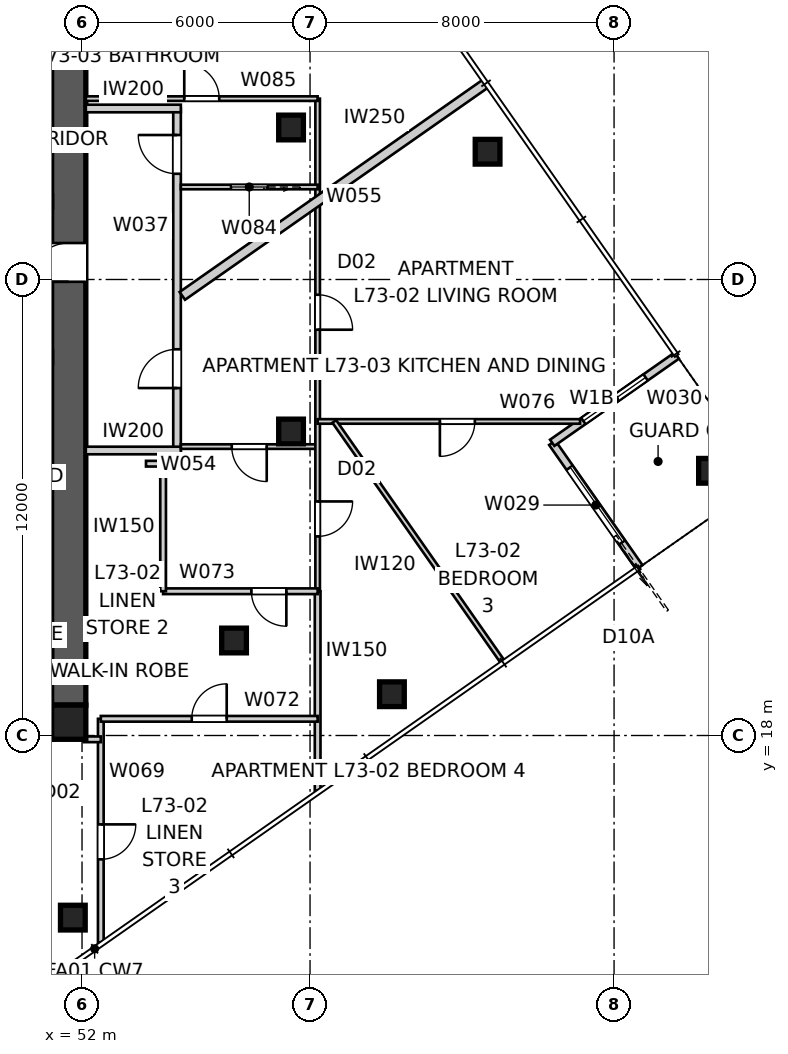
"""IFC4 building model, lengths in metres.
Left out: names, types, materials, properties, quantities, classifications, styles, units other than length and angle.
Written with IfcOpenShell. Run it as: python <this file> out.ifc"""

import sys

from ifc_helpers import new_model, si_unit, direction, frame, frame_2d, origin, origin_2d, place, context, subcontext, project, spatial, polyline, rectangle, outline, extrude, element, fill, save


model = new_model("IFC4")
c1 = context("Model", 3, precision=1e-05, world=origin(), true_north=direction((0.0, 1.0)))
c2 = subcontext(c1, "Body", "Model", "MODEL_VIEW")
j1 = project(units=[si_unit("LENGTHUNIT", "METRE"), si_unit("PLANEANGLEUNIT", "RADIAN")], contexts=[c1])
p1 = place(None, origin())
s1 = spatial("IfcSite", under=j1, at=p1, CompositionType="ELEMENT")
p2 = place(p1, origin())
s2 = spatial("IfcBuilding", under=s1, at=p2, CompositionType="ELEMENT")
p3 = place(p2, frame((0.0, 0.0, 264.2)))
s3 = spatial("IfcBuildingStorey", under=s2, at=p3, CompositionType="ELEMENT", Elevation=264.2)
p4 = place(p3, frame((51.2, 18.35, 0.0), z_axis=(0.0, 0.0, 1.0), x_axis=(-1.0, 0.0, 0.0)))
e1 = element("IfcWall", 1, at=p4, inside=s3, PredefinedType="SHEAR", context=c2, shape_type="SweptSolid", body=[
    extrude(outline(polyline([(0.0, -0.45), (22.4, -0.45), (22.4, -0.025), (22.85, -0.025), (22.85, 0.025), (22.4, 0.025), (22.4, 0.45), (0.0, 0.45), (0.0, 0.025), (-0.45, 0.025), (-0.45, -0.025), (0.0, -0.025), (0.0, -0.45)])), origin(), (0.0, 0.0, 1.0), 3.4),
])
p5 = place(p3, frame((51.65, 18.8, 0.0), z_axis=(0.0, 0.0, 1.0), x_axis=(0.0, 1.0, 0.0)))
e2 = element("IfcWall", 2, at=p5, inside=s3, PredefinedType="SHEAR", context=c2, shape_type="SweptSolid", body=[
    extrude(outline(polyline([(0.0, -0.45), (22.4, -0.45), (22.4, -0.025), (22.85, -0.025), (22.85, 0.025), (22.4, 0.025), (22.4, 0.45), (0.0, 0.45), (0.0, 0.025), (-0.45, 0.025), (-0.45, -0.025), (0.0, -0.025), (0.0, -0.45)])), origin(), (0.0, 0.0, 1.0), 3.4),
])
p6 = place(p5, frame((11.14, 0.0, 0.0)))
e3 = element("IfcOpeningElement", 3, at=p6, cuts=e2, PredefinedType="OPENING", context=c2, shape_type="SweptSolid", body=[
    extrude(rectangle(XDim=1.02, YDim=2.4, at=frame_2d((0.51, 1.2))), frame((0.0, 0.46, 0.0), z_axis=(0.0, -1.0, 0.0), x_axis=(1.0, 0.0, 0.0)), (0.0, 0.0, 1.0), 0.92),
])
p7 = place(p3, frame((51.65, 18.35, 0.0), z_axis=(0.0, 0.0, 1.0), x_axis=(1.0, 0.0, 0.0)))
e4 = element("IfcColumn", 4, at=p7, inside=s3, PredefinedType="COLUMN", context=c2, shape_type="SweptSolid", body=[
    extrude(rectangle(XDim=0.9, YDim=0.9, at=origin_2d()), origin(), (0.0, 0.0, 1.0), 3.4),
])
for number, where, z_axis, x_axis in (
    (5, (51.758, 13.207, 0.0), (0.0, 0.0, 1.0), (1.0, 0.0, 0.0)),
    (6, (60.155, 19.086, 0.0), (0.0, 0.0, 1.0), (1.0, 0.0, 0.0)),
    (7, (68.551, 24.966, 0.0), (0.0, 0.0, 1.0), (1.0, 0.0, 0.0)),
    (8, (62.672, 33.362, 0.0), (0.0, 0.0, 1.0), (1.0, 0.0, 0.0)),
):
    element("IfcColumn", number, at=place(p3, frame(where, z_axis=z_axis, x_axis=x_axis)), inside=s3, PredefinedType="COLUMN", context=c2, shape_type="SweptSolid", body=[
        extrude(rectangle(XDim=0.65, YDim=0.65, at=origin_2d()), origin(), (0.0, 0.0, 1.0), 3.2),
    ])
for number, where, z_axis, x_axis in (
    (9, (57.5, 26.0, 0.0), (0.0, 0.0, 1.0), (1.0, 0.0, 0.0)),
    (10, (57.5, 34.0, 0.0), (0.0, 0.0, 1.0), (1.0, 0.0, 0.0)),
    (11, (56.0, 20.5, 0.0), (0.0, 0.0, 1.0), (1.0, 0.0, 0.0)),
):
    element("IfcColumn", number, at=place(p3, frame(where, z_axis=z_axis, x_axis=x_axis)), inside=s3, PredefinedType="COLUMN", context=c2, shape_type="SweptSolid", body=[
        extrude(rectangle(XDim=0.65, YDim=0.65, at=origin_2d()), origin(), (0.0, 0.0, 1.0), 3.4),
    ])
p8 = place(p3, frame((66.667, 22.426, 0.0), z_axis=(0.0, 0.0, 1.0), x_axis=(-0.573556557423, 0.819165963305, 0.0)))
e12 = element("IfcWall", 12, at=p8, inside=s3, PredefinedType="SOLIDWALL", context=c2, shape_type="SweptSolid", body=[
    extrude(rectangle(XDim=4.0, YDim=0.2, at=frame_2d((2.0, 0.0))), origin(), (0.0, 0.0, 1.0), 3.2),
])
p9 = place(p8, frame((0.8, 0.0, 0.0)))
e13 = element("IfcOpeningElement", 13, at=p9, cuts=e12, PredefinedType="OPENING", context=c2, shape_type="SweptSolid", body=[
    extrude(rectangle(XDim=2.4, YDim=2.1, at=frame_2d((1.2, 1.05))), frame((0.0, 0.11, 0.0), z_axis=(0.0, -1.0, 0.0), x_axis=(1.0, 0.0, 0.0)), (0.0, 0.0, 1.0), 0.22),
])
p10 = place(p3, frame((64.373, 25.702, 0.0), z_axis=(0.0, 0.0, 1.0), x_axis=(0.819137286189, 0.573597512525, 0.0)))
e14 = element("IfcWall", 14, at=p10, inside=s3, PredefinedType="SOLIDWALL", context=c2, shape_type="SweptSolid", body=[
    extrude(rectangle(XDim=4.0, YDim=0.2, at=frame_2d((2.0, 0.0))), origin(), (0.0, 0.0, 1.0), 3.2),
])
p11 = place(p10, frame((1.0, 0.0, 0.4)))
e15 = element("IfcOpeningElement", 15, at=p11, cuts=e14, PredefinedType="OPENING", context=c2, shape_type="SweptSolid", body=[
    extrude(rectangle(XDim=2.0, YDim=1.8, at=frame_2d((1.0, 0.9))), frame((0.0, 0.11, 0.0), z_axis=(0.0, -1.0, 0.0), x_axis=(1.0, 0.0, 0.0)), (0.0, 0.0, 1.0), 0.22),
])
p12 = place(p3, frame((54.5, 25.5, 0.0), z_axis=(0.0, 0.0, 1.0), x_axis=(0.0, 1.0, 0.0)))
e16 = element("IfcWall", 16, at=p12, inside=s3, PredefinedType="PARTITIONING", context=c2, shape_type="SweptSolid", body=[
    extrude(rectangle(XDim=9.0, YDim=0.2, at=frame_2d((4.5, 0.0))), origin(), (0.0, 0.0, 1.0), 3.2),
])
p13 = place(p12, frame((1.643, 0.0, 0.0)))
e17 = element("IfcOpeningElement", 17, at=p13, cuts=e16, PredefinedType="OPENING", context=c2, shape_type="SweptSolid", body=[
    extrude(rectangle(XDim=1.02, YDim=2.34, at=frame_2d((0.51, 1.17))), frame((0.0, 0.11, 0.0), z_axis=(0.0, -1.0, 0.0), x_axis=(1.0, 0.0, 0.0)), (0.0, 0.0, 1.0), 0.22),
])
p14 = place(p12, frame((7.282, 0.0, 0.0)))
e18 = element("IfcOpeningElement", 18, at=p14, cuts=e16, PredefinedType="OPENING", context=c2, shape_type="SweptSolid", body=[
    extrude(rectangle(XDim=1.02, YDim=2.34, at=frame_2d((0.51, 1.17))), frame((0.0, 0.11, 0.0), z_axis=(0.0, -1.0, 0.0), x_axis=(1.0, 0.0, 0.0)), (0.0, 0.0, 1.0), 0.22),
])
for number, where, z_axis, x_axis in (
    (19, (52.1, 34.5, 0.0), (0.0, 0.0, 1.0), (1.0, 0.0, 0.0)),
    (20, (52.1, 25.5, 0.0), (0.0, 0.0, 1.0), (1.0, 0.0, 0.0)),
):
    element("IfcWall", number, at=place(p3, frame(where, z_axis=z_axis, x_axis=x_axis)), inside=s3, PredefinedType="PARTITIONING", context=c2, shape_type="SweptSolid", body=[
        extrude(rectangle(XDim=2.5, YDim=0.2, at=frame_2d((1.25, 0.0))), origin(), (0.0, 0.0, 1.0), 3.2),
    ])
p15 = place(p3, frame((62.631, 35.164, 0.0), z_axis=(0.0, 0.0, 1.0), x_axis=(-0.81915902312, -0.573566469418, 0.0)))
e21 = element("IfcWall", 21, at=p15, inside=s3, PredefinedType="PARTITIONING", context=c2, shape_type="SweptSolid", body=[
    extrude(rectangle(XDim=9.756, YDim=0.25, at=frame_2d((4.878, 0.0))), origin(), (0.0, 0.0, 1.0), 3.2),
])
p16 = place(p3, frame((58.2, 25.603, 0.0), z_axis=(0.0, 0.0, 1.0), x_axis=(-1.0, 0.0, 0.0)))
e22 = element("IfcWall", 22, at=p16, inside=s3, PredefinedType="PARTITIONING", context=c2, shape_type="SweptSolid", body=[
    extrude(rectangle(XDim=3.6, YDim=0.12, at=frame_2d((1.8, 0.0))), origin(), (0.0, 0.0, 1.0), 3.2),
])
p17 = place(p16, frame((1.34, 0.0, 0.0)))
e23 = element("IfcOpeningElement", 23, at=p17, cuts=e22, PredefinedType="OPENING", context=c2, shape_type="SweptSolid", body=[
    extrude(rectangle(XDim=0.92, YDim=2.34, at=frame_2d((0.46, 1.17))), frame((0.0, 0.07, 0.0), z_axis=(0.0, -1.0, 0.0), x_axis=(1.0, 0.0, 0.0)), (0.0, 0.0, 1.0), 0.14),
])
p18 = place(p3, frame((58.2, 34.76, 0.0), z_axis=(0.0, 0.0, 1.0), x_axis=(0.0, -1.0, 0.0)))
e24 = element("IfcWall", 24, at=p18, inside=s3, PredefinedType="PARTITIONING", context=c2, shape_type="SweptSolid", body=[
    extrude(rectangle(XDim=12.964, YDim=0.12, at=frame_2d((6.482, 0.0))), origin(), (0.0, 0.0, 1.0), 3.2),
])
p19 = place(p18, frame((5.162, 0.0, 0.0)))
e25 = element("IfcOpeningElement", 25, at=p19, cuts=e24, PredefinedType="OPENING", context=c2, shape_type="SweptSolid", body=[
    extrude(rectangle(XDim=0.92, YDim=2.34, at=frame_2d((0.46, 1.17))), frame((0.0, 0.07, 0.0), z_axis=(0.0, -1.0, 0.0), x_axis=(1.0, 0.0, 0.0)), (0.0, 0.0, 1.0), 0.14),
])
p20 = place(p18, frame((10.6, 0.0, 0.0)))
e26 = element("IfcOpeningElement", 26, at=p20, cuts=e24, PredefinedType="OPENING", context=c2, shape_type="SweptSolid", body=[
    extrude(rectangle(XDim=0.92, YDim=2.34, at=frame_2d((0.46, 1.17))), frame((0.0, 0.07, 0.0), z_axis=(0.0, -1.0, 0.0), x_axis=(1.0, 0.0, 0.0)), (0.0, 0.0, 1.0), 0.14),
])
p21 = place(p3, frame((51.422, 11.8, 0.0), z_axis=(0.0, 0.0, 1.0), x_axis=(-1.0, 0.0, 0.0)))
e27 = element("IfcWall", 27, at=p21, inside=s3, PredefinedType="PARTITIONING", context=c2, shape_type="SweptSolid", body=[
    extrude(rectangle(XDim=6.213, YDim=0.12, at=frame_2d((3.106, 0.0))), origin(), (0.0, 0.0, 1.0), 3.2),
])
p22 = place(p21, frame((1.061, 0.0, 0.0)))
e28 = element("IfcOpeningElement", 28, at=p22, cuts=e27, PredefinedType="OPENING", context=c2, shape_type="SweptSolid", body=[
    extrude(rectangle(XDim=0.92, YDim=2.1, at=frame_2d((0.46, 1.05))), frame((0.0, 0.07, 0.0), z_axis=(0.0, -1.0, 0.0), x_axis=(1.0, 0.0, 0.0)), (0.0, 0.0, 1.0), 0.14),
])
p23 = place(p3, frame((52.494, 18.439, 0.0), z_axis=(0.0, 0.0, 1.0), x_axis=(0.0, -1.0, 0.0)))
e29 = element("IfcWall", 29, at=p23, inside=s3, PredefinedType="SOLIDWALL", context=c2, shape_type="SweptSolid", body=[
    extrude(rectangle(XDim=5.888, YDim=0.15, at=frame_2d((2.944, 0.0))), origin(), (0.0, 0.0, 1.0), 3.2),
])
p24 = place(p23, frame((2.778, 0.0, 0.0)))
e30 = element("IfcOpeningElement", 30, at=p24, cuts=e29, PredefinedType="OPENING", context=c2, shape_type="SweptSolid", body=[
    extrude(rectangle(XDim=0.92, YDim=2.34, at=frame_2d((0.46, 1.17))), frame((0.0, 0.085, 0.0), z_axis=(0.0, -1.0, 0.0), x_axis=(1.0, 0.0, 0.0)), (0.0, 0.0, 1.0), 0.17),
])
p25 = place(p3, frame((52.05, 17.9, 0.0), z_axis=(0.0, 0.0, 1.0), x_axis=(1.0, 0.0, 0.0)))
e31 = element("IfcWall", 31, at=p25, inside=s3, PredefinedType="SOLIDWALL", context=c2, shape_type="SweptSolid", body=[
    extrude(rectangle(XDim=0.444, YDim=0.15, at=frame_2d((0.222, 0.0))), origin(), (0.0, 0.0, 1.0), 3.2),
])
p26 = place(p3, frame((58.2, 21.796, 0.0), z_axis=(0.0, 0.0, 1.0), x_axis=(0.0, -1.0, 0.0)))
e32 = element("IfcWall", 32, at=p26, inside=s3, PredefinedType="SOLIDWALL", context=c2, shape_type="SweptSolid", body=[
    extrude(rectangle(XDim=5.25, YDim=0.15, at=frame_2d((2.625, 0.0))), origin(), (0.0, 0.0, 1.0), 3.2),
])
p27 = place(p3, frame((52.494, 18.439, 0.0), z_axis=(0.0, 0.0, 1.0), x_axis=(1.0, 0.0, 0.0)))
e33 = element("IfcWall", 33, at=p27, inside=s3, PredefinedType="SOLIDWALL", context=c2, shape_type="SweptSolid", body=[
    extrude(rectangle(XDim=5.706, YDim=0.15, at=frame_2d((2.853, 0.0))), origin(), (0.0, 0.0, 1.0), 3.2),
])
p28 = place(p27, frame((2.393, 0.0, 0.0)))
e34 = element("IfcOpeningElement", 34, at=p28, cuts=e33, PredefinedType="OPENING", context=c2, shape_type="SweptSolid", body=[
    extrude(rectangle(XDim=0.92, YDim=2.34, at=frame_2d((0.46, 1.17))), frame((0.0, 0.085, 0.0), z_axis=(0.0, -1.0, 0.0), x_axis=(1.0, 0.0, 0.0)), (0.0, 0.0, 1.0), 0.17),
])
p29 = place(p3, frame((58.2, 21.796, 0.0), z_axis=(0.0, 0.0, 1.0), x_axis=(-1.0, 0.0, 0.0)))
e35 = element("IfcWall", 35, at=p29, inside=s3, PredefinedType="SOLIDWALL", context=c2, shape_type="SweptSolid", body=[
    extrude(rectangle(XDim=4.067, YDim=0.15, at=frame_2d((2.033, 0.0))), origin(), (0.0, 0.0, 1.0), 3.2),
])
p30 = place(p29, frame((0.823, 0.0, 0.0)))
e36 = element("IfcOpeningElement", 36, at=p30, cuts=e35, PredefinedType="OPENING", context=c2, shape_type="SweptSolid", body=[
    extrude(rectangle(XDim=0.92, YDim=2.1, at=frame_2d((0.46, 1.05))), frame((0.0, 0.085, 0.0), z_axis=(0.0, -1.0, 0.0), x_axis=(1.0, 0.0, 0.0)), (0.0, 0.0, 1.0), 0.17),
])
p31 = place(p3, frame((54.133, 21.796, 0.0), z_axis=(0.0, 0.0, 1.0), x_axis=(0.0, 1.0, 0.0)))
e37 = element("IfcWall", 37, at=p31, inside=s3, PredefinedType="SOLIDWALL", context=c2, shape_type="SweptSolid", body=[
    extrude(rectangle(XDim=3.357, YDim=0.15, at=frame_2d((1.678, 0.0))), origin(), (0.0, 0.0, 1.0), 3.2),
])
p32 = place(p3, frame((54.133, 25.153, 0.0), z_axis=(0.0, 0.0, 1.0), x_axis=(-1.0, 0.0, 0.0)))
e38 = element("IfcWall", 38, at=p32, inside=s3, PredefinedType="SOLIDWALL", context=c2, shape_type="SweptSolid", body=[
    extrude(rectangle(XDim=0.45, YDim=0.15, at=frame_2d((0.225, 0.0))), origin(), (0.0, 0.0, 1.0), 3.2),
])
p33 = place(p3, frame((65.106, 26.265, 0.0), z_axis=(0.0, 0.0, 1.0), x_axis=(-1.0, 0.0, 0.0)))
e39 = element("IfcWall", 39, at=p33, inside=s3, PredefinedType="PARTITIONING", context=c2, shape_type="SweptSolid", body=[
    extrude(rectangle(XDim=6.906, YDim=0.12, at=frame_2d((3.453, 0.0))), origin(), (0.0, 0.0, 1.0), 2.3),
])
p34 = place(p33, frame((2.77, 0.0, 0.0)))
e40 = element("IfcOpeningElement", 40, at=p34, cuts=e39, PredefinedType="OPENING", context=c2, shape_type="SweptSolid", body=[
    extrude(rectangle(XDim=0.92, YDim=2.1, at=frame_2d((0.46, 1.05))), frame((0.0, 0.07, 0.0), z_axis=(0.0, -1.0, 0.0), x_axis=(1.0, 0.0, 0.0)), (0.0, 0.0, 1.0), 0.14),
])
p35 = place(p3, frame((63.06, 19.949, 0.0), z_axis=(0.0, 0.0, 1.0), x_axis=(-0.573562225439, 0.819161994693, 0.0)))
e41 = element("IfcWall", 41, at=p35, inside=s3, PredefinedType="PARTITIONING", context=c2, shape_type="SweptSolid", body=[
    extrude(rectangle(XDim=7.71, YDim=0.12, at=frame_2d((3.855, 0.0))), origin(), (0.0, 0.0, 1.0), 3.2),
])
p36 = place(p3, frame((58.2, 32.434, 0.0), z_axis=(0.0, 0.0, 1.0), x_axis=(-1.0, 0.0, 0.0)))
e42 = element("IfcWall", 42, at=p36, inside=s3, PredefinedType="PARTITIONING", context=c2, shape_type="SweptSolid", body=[
    extrude(rectangle(XDim=3.6, YDim=0.12, at=frame_2d((1.8, 0.0))), origin(), (0.0, 0.0, 1.0), 3.2),
])
p37 = place(p36, frame((1.32, 0.0, 0.0)))
e43 = element("IfcOpeningElement", 43, at=p37, cuts=e42, PredefinedType="OPENING", context=c2, shape_type="SweptSolid", body=[
    extrude(rectangle(XDim=0.96, YDim=2.1, at=frame_2d((0.48, 1.05))), frame((0.0, 0.07, 0.0), z_axis=(0.0, -1.0, 0.0), x_axis=(1.0, 0.0, 0.0)), (0.0, 0.0, 1.0), 0.14),
])
p38 = place(p3, frame((52.1, 34.76, 0.0), z_axis=(0.0, 0.0, 1.0), x_axis=(1.0, 0.0, 0.0)))
e44 = element("IfcWall", 44, at=p38, inside=s3, PredefinedType="PARTITIONING", context=c2, shape_type="SweptSolid", body=[
    extrude(rectangle(XDim=6.1, YDim=0.12, at=frame_2d((3.05, 0.0))), origin(), (0.0, 0.0, 1.0), 3.2),
])
p39 = place(p38, frame((2.59, 0.0, 0.0)))
e45 = element("IfcOpeningElement", 45, at=p39, cuts=e44, PredefinedType="OPENING", context=c2, shape_type="SweptSolid", body=[
    extrude(rectangle(XDim=0.92, YDim=2.34, at=frame_2d((0.46, 1.17))), frame((0.0, 0.07, 0.0), z_axis=(0.0, -1.0, 0.0), x_axis=(1.0, 0.0, 0.0)), (0.0, 0.0, 1.0), 0.14),
])
p40 = place(p9, origin())
e46 = element("IfcDoor", 46, at=p40, inside=s3, OperationType="SLIDING_TO_LEFT", PredefinedType="DOOR", context=c2, shape_type="SweptSolid", body=[
    extrude(rectangle(XDim=2.4, YDim=2.1, at=frame_2d((1.2, 1.05))), frame((0.0, 0.025, 0.0), z_axis=(0.0, -1.0, 0.0), x_axis=(1.0, 0.0, 0.0)), (0.0, 0.0, 1.0), 0.05),
])
fill(e13, e46)
p41 = place(p11, origin())
e47 = element("IfcWindow", 47, at=p41, inside=s3, PartitioningType="SINGLE_PANEL", PredefinedType="WINDOW", context=c2, shape_type="SweptSolid", body=[
    extrude(rectangle(XDim=2.0, YDim=1.8, at=frame_2d((1.0, 0.9))), frame((0.0, 0.03, 0.0), z_axis=(0.0, -1.0, 0.0), x_axis=(1.0, 0.0, 0.0)), (0.0, 0.0, 1.0), 0.06),
])
fill(e15, e47)
p42 = place(p13, origin())
e48 = element("IfcDoor", 48, at=p42, inside=s3, OperationType="SINGLE_SWING_LEFT", PredefinedType="DOOR", context=c2, shape_type="SweptSolid", body=[
    extrude(rectangle(XDim=1.02, YDim=2.34, at=frame_2d((0.51, 1.17))), frame((0.0, 0.025, 0.0), z_axis=(0.0, -1.0, 0.0), x_axis=(1.0, 0.0, 0.0)), (0.0, 0.0, 1.0), 0.05),
])
fill(e17, e48)
p43 = place(p14, origin())
e49 = element("IfcDoor", 49, at=p43, inside=s3, OperationType="SINGLE_SWING_RIGHT", PredefinedType="DOOR", context=c2, shape_type="SweptSolid", body=[
    extrude(rectangle(XDim=1.02, YDim=2.34, at=frame_2d((0.51, 1.17))), frame((0.0, 0.025, 0.0), z_axis=(0.0, -1.0, 0.0), x_axis=(1.0, 0.0, 0.0)), (0.0, 0.0, 1.0), 0.05),
])
fill(e18, e49)
p44 = place(p19, origin())
e50 = element("IfcDoor", 50, at=p44, inside=s3, OperationType="SINGLE_SWING_RIGHT", PredefinedType="DOOR", context=c2, shape_type="SweptSolid", body=[
    extrude(rectangle(XDim=0.92, YDim=2.34, at=frame_2d((0.46, 1.17))), frame((0.0, 0.025, 0.0), z_axis=(0.0, -1.0, 0.0), x_axis=(1.0, 0.0, 0.0)), (0.0, 0.0, 1.0), 0.05),
])
fill(e25, e50)
p45 = place(p17, origin())
e51 = element("IfcDoor", 51, at=p45, inside=s3, OperationType="SINGLE_SWING_LEFT", PredefinedType="DOOR", context=c2, shape_type="SweptSolid", body=[
    extrude(rectangle(XDim=0.92, YDim=2.34, at=frame_2d((0.46, 1.17))), frame((0.0, 0.025, 0.0), z_axis=(0.0, -1.0, 0.0), x_axis=(1.0, 0.0, 0.0)), (0.0, 0.0, 1.0), 0.05),
])
fill(e23, e51)
p46 = place(p39, origin())
e52 = element("IfcDoor", 52, at=p46, inside=s3, OperationType="SINGLE_SWING_LEFT", PredefinedType="DOOR", context=c2, shape_type="SweptSolid", body=[
    extrude(rectangle(XDim=0.92, YDim=2.34, at=frame_2d((0.46, 1.17))), frame((0.0, 0.025, 0.0), z_axis=(0.0, -1.0, 0.0), x_axis=(1.0, 0.0, 0.0)), (0.0, 0.0, 1.0), 0.05),
])
fill(e45, e52)
p47 = place(p37, origin())
e53 = element("IfcDoor", 53, at=p47, inside=s3, OperationType="SLIDING_TO_LEFT", PredefinedType="DOOR", context=c2, shape_type="SweptSolid", body=[
    extrude(rectangle(XDim=0.96, YDim=2.1, at=frame_2d((0.48, 1.05))), frame((0.0, 0.025, 0.0), z_axis=(0.0, -1.0, 0.0), x_axis=(1.0, 0.0, 0.0)), (0.0, 0.0, 1.0), 0.05),
])
fill(e43, e53)
p48 = place(p34, origin())
e54 = element("IfcDoor", 54, at=p48, inside=s3, OperationType="SINGLE_SWING_RIGHT", PredefinedType="DOOR", context=c2, shape_type="SweptSolid", body=[
    extrude(rectangle(XDim=0.92, YDim=2.1, at=frame_2d((0.46, 1.05))), frame((0.0, 0.025, 0.0), z_axis=(0.0, -1.0, 0.0), x_axis=(1.0, 0.0, 0.0)), (0.0, 0.0, 1.0), 0.05),
])
fill(e40, e54)
p49 = place(p30, origin())
e55 = element("IfcDoor", 55, at=p49, inside=s3, OperationType="SINGLE_SWING_LEFT", PredefinedType="DOOR", context=c2, shape_type="SweptSolid", body=[
    extrude(rectangle(XDim=0.92, YDim=2.1, at=frame_2d((0.46, 1.05))), frame((0.0, 0.025, 0.0), z_axis=(0.0, -1.0, 0.0), x_axis=(1.0, 0.0, 0.0)), (0.0, 0.0, 1.0), 0.05),
])
fill(e36, e55)
p50 = place(p20, origin())
e56 = element("IfcDoor", 56, at=p50, inside=s3, OperationType="SINGLE_SWING_LEFT", PredefinedType="DOOR", context=c2, shape_type="SweptSolid", body=[
    extrude(rectangle(XDim=0.92, YDim=2.34, at=frame_2d((0.46, 1.17))), frame((0.0, 0.025, 0.0), z_axis=(0.0, -1.0, 0.0), x_axis=(1.0, 0.0, 0.0)), (0.0, 0.0, 1.0), 0.05),
])
fill(e26, e56)
p51 = place(p28, origin())
e57 = element("IfcDoor", 57, at=p51, inside=s3, OperationType="SINGLE_SWING_RIGHT", PredefinedType="DOOR", context=c2, shape_type="SweptSolid", body=[
    extrude(rectangle(XDim=0.92, YDim=2.34, at=frame_2d((0.46, 1.17))), frame((0.0, 0.025, 0.0), z_axis=(0.0, -1.0, 0.0), x_axis=(1.0, 0.0, 0.0)), (0.0, 0.0, 1.0), 0.05),
])
fill(e34, e57)
p52 = place(p24, origin())
e58 = element("IfcDoor", 58, at=p52, inside=s3, OperationType="SINGLE_SWING_LEFT", PredefinedType="DOOR", context=c2, shape_type="SweptSolid", body=[
    extrude(rectangle(XDim=0.92, YDim=2.34, at=frame_2d((0.46, 1.17))), frame((0.0, 0.025, 0.0), z_axis=(0.0, -1.0, 0.0), x_axis=(1.0, 0.0, 0.0)), (0.0, 0.0, 1.0), 0.05),
])
fill(e30, e58)
p53 = place(p6, origin())
e59 = element("IfcDoor", 59, at=p53, inside=s3, OperationType="SINGLE_SWING_LEFT", PredefinedType="DOOR", context=c2, shape_type="SweptSolid", body=[
    extrude(rectangle(XDim=1.02, YDim=2.4, at=frame_2d((0.51, 1.2))), frame((0.0, 0.025, 0.0), z_axis=(0.0, -1.0, 0.0), x_axis=(1.0, 0.0, 0.0)), (0.0, 0.0, 1.0), 0.05),
])
fill(e3, e59)
save(model, sys.argv[1])
